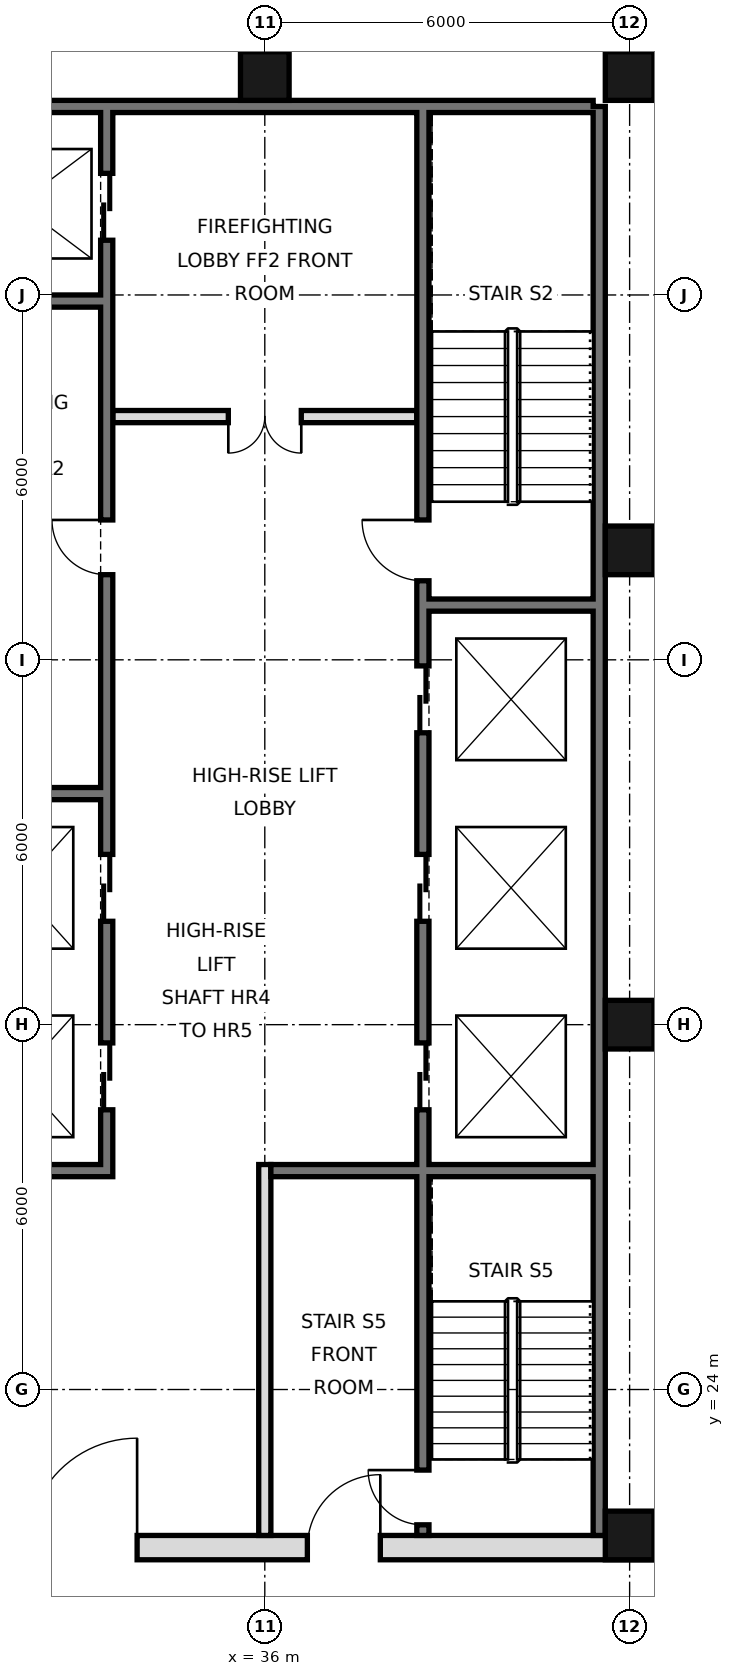
"""IFC4 building model, lengths in metres.
Left out: names, types, materials, properties, quantities, classifications, styles, units other than length and angle.
Written with IfcOpenShell. Run it as: python <this file> out.ifc"""

import sys

from ifc_helpers import new_model, si_unit, direction, frame, frame_2d, origin, origin_2d, place, context, subcontext, project, spatial, rectangle, hollow_rectangle, extrude, element, fill, save


model = new_model("IFC4")
c1 = context("Model", 3, precision=1e-05, world=origin(), true_north=direction((0.0, 1.0)))
c2 = subcontext(c1, "Body", "Model", "MODEL_VIEW")
j1 = project(units=[si_unit("LENGTHUNIT", "METRE"), si_unit("PLANEANGLEUNIT", "RADIAN")], contexts=[c1])
p1 = place(None, origin())
s1 = spatial("IfcSite", under=j1, at=p1, CompositionType="ELEMENT")
p2 = place(p1, origin())
s2 = spatial("IfcBuilding", under=s1, at=p2, CompositionType="ELEMENT")
p3 = place(p2, frame((0.0, 0.0, 263.0)))
s3 = spatial("IfcBuildingStorey", under=s2, at=p3, CompositionType="ELEMENT", Elevation=263.0)
for number, where, z_axis, x_axis in (
    (1, (36.0, 45.6, 0.0), (0.0, 0.0, 1.0), (1.0, 0.0, 0.0)),
    (2, (42.0, 21.6, 0.0), (0.0, 0.0, 1.0), (1.0, 0.0, 0.0)),
    (3, (42.0, 30.0, 0.0), (0.0, 0.0, 1.0), (1.0, 0.0, 0.0)),
    (4, (42.0, 37.8, 0.0), (0.0, 0.0, 1.0), (1.0, 0.0, 0.0)),
    (5, (42.0, 45.6, 0.0), (0.0, 0.0, 1.0), (1.0, 0.0, 0.0)),
):
    element("IfcColumn", number, at=place(p3, frame(where, z_axis=z_axis, x_axis=x_axis)), inside=s3, PredefinedType="COLUMN", context=c2, shape_type="SweptSolid", body=[
        extrude(hollow_rectangle(XDim=0.8, YDim=0.8, WallThickness=0.032, at=origin_2d()), origin(), (0.0, 0.0, 1.0), 3.6),
    ])
p4 = place(p3, frame((41.5, 21.6, 0.0), z_axis=(0.0, 0.0, 1.0), x_axis=(0.0, 1.0, 0.0)))
e6 = element("IfcWall", 6, at=p4, inside=s3, PredefinedType="SOLIDWALL", context=c2, shape_type="SweptSolid", body=[
    extrude(rectangle(XDim=23.5, YDim=0.2, at=frame_2d((11.75, 0.0))), origin(), (0.0, 0.0, 1.0), 3.42),
])
p5 = place(p3, frame((6.6, 45.1, 0.0), z_axis=(0.0, 0.0, 1.0), x_axis=(1.0, 0.0, 0.0)))
e7 = element("IfcWall", 7, at=p5, inside=s3, PredefinedType="SOLIDWALL", context=c2, shape_type="SweptSolid", body=[
    extrude(rectangle(XDim=34.8, YDim=0.2, at=frame_2d((17.4, 0.0))), origin(), (0.0, 0.0, 1.0), 3.42),
])
p6 = place(p3, frame((5.6, 21.4, 0.0), z_axis=(0.0, 0.0, 1.0), x_axis=(1.0, 0.0, 0.0)))
e8 = element("IfcWall", 8, at=p6, inside=s3, PredefinedType="SOLIDWALL", context=c2, shape_type="SweptSolid", body=[
    extrude(rectangle(XDim=36.8, YDim=0.4, at=frame_2d((18.4, 0.0))), origin(), (0.0, 0.0, 1.0), 3.42),
])
p7 = place(p6, frame((8.5, 0.0, 0.0)))
e9 = element("IfcOpeningElement", 9, at=p7, cuts=e8, PredefinedType="OPENING", context=c2, shape_type="SweptSolid", body=[
    extrude(rectangle(XDim=1.8, YDim=2.1, at=frame_2d((0.9, 1.05))), frame((0.0, 0.21, 0.0), z_axis=(0.0, -1.0, 0.0), x_axis=(1.0, 0.0, 0.0)), (0.0, 0.0, 1.0), 0.42),
])
p8 = place(p6, frame((17.5, 0.0, 0.0)))
e10 = element("IfcOpeningElement", 10, at=p8, cuts=e8, PredefinedType="OPENING", context=c2, shape_type="SweptSolid", body=[
    extrude(rectangle(XDim=1.8, YDim=2.1, at=frame_2d((0.9, 1.05))), frame((0.0, 0.21, 0.0), z_axis=(0.0, -1.0, 0.0), x_axis=(1.0, 0.0, 0.0)), (0.0, 0.0, 1.0), 0.42),
])
p9 = place(p6, frame((26.5, 0.0, 0.0)))
e11 = element("IfcOpeningElement", 11, at=p9, cuts=e8, PredefinedType="OPENING", context=c2, shape_type="SweptSolid", body=[
    extrude(rectangle(XDim=1.8, YDim=2.1, at=frame_2d((0.9, 1.05))), frame((0.0, 0.21, 0.0), z_axis=(0.0, -1.0, 0.0), x_axis=(1.0, 0.0, 0.0)), (0.0, 0.0, 1.0), 0.42),
])
p10 = place(p6, frame((4.5, 0.0, 0.0)))
e12 = element("IfcOpeningElement", 12, at=p10, cuts=e8, PredefinedType="OPENING", context=c2, shape_type="SweptSolid", body=[
    extrude(rectangle(XDim=1.2, YDim=2.1, at=frame_2d((0.6, 1.05))), frame((0.0, 0.21, 0.0), z_axis=(0.0, -1.0, 0.0), x_axis=(1.0, 0.0, 0.0)), (0.0, 0.0, 1.0), 0.42),
])
p11 = place(p6, frame((31.1, 0.0, 0.0)))
e13 = element("IfcOpeningElement", 13, at=p11, cuts=e8, PredefinedType="OPENING", context=c2, shape_type="SweptSolid", body=[
    extrude(rectangle(XDim=1.2, YDim=2.1, at=frame_2d((0.6, 1.05))), frame((0.0, 0.21, 0.0), z_axis=(0.0, -1.0, 0.0), x_axis=(1.0, 0.0, 0.0)), (0.0, 0.0, 1.0), 0.42),
])
p12 = place(p3, frame((33.4, 27.5, 0.0), z_axis=(0.0, 0.0, 1.0), x_axis=(0.0, 1.0, 0.0)))
e14 = element("IfcWall", 14, at=p12, inside=s3, PredefinedType="SOLIDWALL", context=c2, shape_type="SweptSolid", body=[
    extrude(rectangle(XDim=17.5, YDim=0.2, at=frame_2d((8.75, 0.0))), origin(), (0.0, 0.0, 1.0), 3.42),
])
p13 = place(p12, frame((1.1, 0.0, 0.0)))
e15 = element("IfcOpeningElement", 15, at=p13, cuts=e14, PredefinedType="OPENING", context=c2, shape_type="SweptSolid", body=[
    extrude(rectangle(XDim=1.1, YDim=2.1, at=frame_2d((0.55, 1.05))), frame((0.0, 0.11, 0.0), z_axis=(0.0, -1.0, 0.0), x_axis=(1.0, 0.0, 0.0)), (0.0, 0.0, 1.0), 0.22),
])
p14 = place(p12, frame((4.2, 0.0, 0.0)))
e16 = element("IfcOpeningElement", 16, at=p14, cuts=e14, PredefinedType="OPENING", context=c2, shape_type="SweptSolid", body=[
    extrude(rectangle(XDim=1.1, YDim=2.1, at=frame_2d((0.55, 1.05))), frame((0.0, 0.11, 0.0), z_axis=(0.0, -1.0, 0.0), x_axis=(1.0, 0.0, 0.0)), (0.0, 0.0, 1.0), 0.22),
])
p15 = place(p12, frame((15.4, 0.0, 0.0)))
e17 = element("IfcOpeningElement", 17, at=p15, cuts=e14, PredefinedType="OPENING", context=c2, shape_type="SweptSolid", body=[
    extrude(rectangle(XDim=1.1, YDim=2.1, at=frame_2d((0.55, 1.05))), frame((0.0, 0.11, 0.0), z_axis=(0.0, -1.0, 0.0), x_axis=(1.0, 0.0, 0.0)), (0.0, 0.0, 1.0), 0.22),
])
p16 = place(p12, frame((9.9, 0.0, 0.0)))
e18 = element("IfcOpeningElement", 18, at=p16, cuts=e14, PredefinedType="OPENING", context=c2, shape_type="SweptSolid", body=[
    extrude(rectangle(XDim=0.9, YDim=2.1, at=frame_2d((0.45, 1.05))), frame((0.0, 0.11, 0.0), z_axis=(0.0, -1.0, 0.0), x_axis=(1.0, 0.0, 0.0)), (0.0, 0.0, 1.0), 0.22),
])
p17 = place(p3, frame((36.0, 21.6, 0.0), z_axis=(0.0, 0.0, 1.0), x_axis=(0.0, 1.0, 0.0)))
e19 = element("IfcWall", 19, at=p17, inside=s3, PredefinedType="PARTITIONING", context=c2, shape_type="SweptSolid", body=[
    extrude(rectangle(XDim=6.1, YDim=0.2, at=frame_2d((3.05, 0.0))), origin(), (0.0, 0.0, 1.0), 3.42),
])
p18 = place(p3, frame((38.6, 21.6, 0.0), z_axis=(0.0, 0.0, 1.0), x_axis=(0.0, 1.0, 0.0)))
e20 = element("IfcWall", 20, at=p18, inside=s3, PredefinedType="SOLIDWALL", context=c2, shape_type="SweptSolid", body=[
    extrude(rectangle(XDim=23.4, YDim=0.2, at=frame_2d((11.7, 0.0))), origin(), (0.0, 0.0, 1.0), 3.42),
])
p19 = place(p18, frame((7.0, 0.0, 0.0)))
e21 = element("IfcOpeningElement", 21, at=p19, cuts=e20, PredefinedType="OPENING", context=c2, shape_type="SweptSolid", body=[
    extrude(rectangle(XDim=1.1, YDim=2.1, at=frame_2d((0.55, 1.05))), frame((0.0, 0.11, 0.0), z_axis=(0.0, -1.0, 0.0), x_axis=(1.0, 0.0, 0.0)), (0.0, 0.0, 1.0), 0.22),
])
p20 = place(p18, frame((10.1, 0.0, 0.0)))
e22 = element("IfcOpeningElement", 22, at=p20, cuts=e20, PredefinedType="OPENING", context=c2, shape_type="SweptSolid", body=[
    extrude(rectangle(XDim=1.1, YDim=2.1, at=frame_2d((0.55, 1.05))), frame((0.0, 0.11, 0.0), z_axis=(0.0, -1.0, 0.0), x_axis=(1.0, 0.0, 0.0)), (0.0, 0.0, 1.0), 0.22),
])
p21 = place(p18, frame((13.2, 0.0, 0.0)))
e23 = element("IfcOpeningElement", 23, at=p21, cuts=e20, PredefinedType="OPENING", context=c2, shape_type="SweptSolid", body=[
    extrude(rectangle(XDim=1.1, YDim=2.1, at=frame_2d((0.55, 1.05))), frame((0.0, 0.11, 0.0), z_axis=(0.0, -1.0, 0.0), x_axis=(1.0, 0.0, 0.0)), (0.0, 0.0, 1.0), 0.22),
])
p22 = place(p18, frame((15.7, 0.0, 0.0)))
e24 = element("IfcOpeningElement", 24, at=p22, cuts=e20, PredefinedType="OPENING", context=c2, shape_type="SweptSolid", body=[
    extrude(rectangle(XDim=1.0, YDim=2.1, at=frame_2d((0.5, 1.05))), frame((0.0, 0.11, 0.0), z_axis=(0.0, -1.0, 0.0), x_axis=(1.0, 0.0, 0.0)), (0.0, 0.0, 1.0), 0.22),
])
p23 = place(p18, frame((0.175, 0.0, 0.0)))
e25 = element("IfcOpeningElement", 25, at=p23, cuts=e20, PredefinedType="OPENING", context=c2, shape_type="SweptSolid", body=[
    extrude(rectangle(XDim=0.9, YDim=2.1, at=frame_2d((0.45, 1.05))), frame((0.0, 0.11, 0.0), z_axis=(0.0, -1.0, 0.0), x_axis=(1.0, 0.0, 0.0)), (0.0, 0.0, 1.0), 0.22),
])
p24 = place(p3, frame((30.6, 27.6, 0.0), z_axis=(0.0, 0.0, 1.0), x_axis=(1.0, 0.0, 0.0)))
e26 = element("IfcWall", 26, at=p24, inside=s3, PredefinedType="SOLIDWALL", context=c2, shape_type="SweptSolid", body=[
    extrude(rectangle(XDim=2.7, YDim=0.2, at=frame_2d((1.35, 0.0))), origin(), (0.0, 0.0, 1.0), 3.42),
])
p25 = place(p3, frame((36.1, 27.6, 0.0), z_axis=(0.0, 0.0, 1.0), x_axis=(1.0, 0.0, 0.0)))
e27 = element("IfcWall", 27, at=p25, inside=s3, PredefinedType="SOLIDWALL", context=c2, shape_type="SweptSolid", body=[
    extrude(rectangle(XDim=5.3, YDim=0.2, at=frame_2d((2.65, 0.0))), origin(), (0.0, 0.0, 1.0), 3.42),
])
for number, where, z_axis, x_axis in (
    (28, (30.6, 33.8, 0.0), (0.0, 0.0, 1.0), (1.0, 0.0, 0.0)),
    (29, (38.7, 36.9, 0.0), (0.0, 0.0, 1.0), (1.0, 0.0, 0.0)),
):
    element("IfcWall", number, at=place(p3, frame(where, z_axis=z_axis, x_axis=x_axis)), inside=s3, PredefinedType="SOLIDWALL", context=c2, shape_type="SweptSolid", body=[
        extrude(rectangle(XDim=2.7, YDim=0.2, at=frame_2d((1.35, 0.0))), origin(), (0.0, 0.0, 1.0), 3.42),
    ])
p26 = place(p3, frame((33.5, 40.0, 0.0), z_axis=(0.0, 0.0, 1.0), x_axis=(1.0, 0.0, 0.0)))
e30 = element("IfcWall", 30, at=p26, inside=s3, PredefinedType="PARTITIONING", context=c2, shape_type="SweptSolid", body=[
    extrude(rectangle(XDim=5.0, YDim=0.2, at=frame_2d((2.5, 0.0))), origin(), (0.0, 0.0, 1.0), 3.42),
])
p27 = place(p26, frame((1.9, 0.0, 0.0)))
e31 = element("IfcOpeningElement", 31, at=p27, cuts=e30, PredefinedType="OPENING", context=c2, shape_type="SweptSolid", body=[
    extrude(rectangle(XDim=1.2, YDim=2.1, at=frame_2d((0.6, 1.05))), frame((0.0, 0.11, 0.0), z_axis=(0.0, -1.0, 0.0), x_axis=(1.0, 0.0, 0.0)), (0.0, 0.0, 1.0), 0.22),
])
p28 = place(p3, frame((30.6, 41.9, 0.0), z_axis=(0.0, 0.0, 1.0), x_axis=(1.0, 0.0, 0.0)))
e32 = element("IfcWall", 32, at=p28, inside=s3, PredefinedType="SOLIDWALL", context=c2, shape_type="SweptSolid", body=[
    extrude(rectangle(XDim=2.7, YDim=0.2, at=frame_2d((1.35, 0.0))), origin(), (0.0, 0.0, 1.0), 3.42),
])
p29 = place(p9, frame((1.8, 0.0, 0.0), z_axis=(0.0, 0.0, 1.0), x_axis=(-1.0, 0.0, 0.0)))
e33 = element("IfcDoor", 33, at=p29, inside=s3, OperationType="SINGLE_SWING_LEFT", PredefinedType="DOOR", context=c2, shape_type="SweptSolid", body=[
    extrude(rectangle(XDim=1.8, YDim=2.1, at=frame_2d((0.9, 1.05))), frame((0.0, 0.025, 0.0), z_axis=(0.0, -1.0, 0.0), x_axis=(1.0, 0.0, 0.0)), (0.0, 0.0, 1.0), 0.05),
])
fill(e11, e33)
p30 = place(p11, frame((1.2, 0.0, 0.0), z_axis=(0.0, 0.0, 1.0), x_axis=(-1.0, 0.0, 0.0)))
e34 = element("IfcDoor", 34, at=p30, inside=s3, OperationType="SINGLE_SWING_LEFT", PredefinedType="DOOR", context=c2, shape_type="SweptSolid", body=[
    extrude(rectangle(XDim=1.2, YDim=2.1, at=frame_2d((0.6, 1.05))), frame((0.0, 0.025, 0.0), z_axis=(0.0, -1.0, 0.0), x_axis=(1.0, 0.0, 0.0)), (0.0, 0.0, 1.0), 0.05),
])
fill(e13, e34)
p31 = place(p27, frame((1.2, 0.0, 0.0), z_axis=(0.0, 0.0, 1.0), x_axis=(-1.0, 0.0, 0.0)))
e35 = element("IfcDoor", 35, at=p31, inside=s3, OperationType="DOUBLE_DOOR_SINGLE_SWING", PredefinedType="DOOR", context=c2, shape_type="SweptSolid", body=[
    extrude(rectangle(XDim=1.2, YDim=2.1, at=frame_2d((0.6, 1.05))), frame((0.0, 0.025, 0.0), z_axis=(0.0, -1.0, 0.0), x_axis=(1.0, 0.0, 0.0)), (0.0, 0.0, 1.0), 0.05),
])
fill(e31, e35)
p32 = place(p19, origin())
e36 = element("IfcDoor", 36, at=p32, inside=s3, OperationType="DOUBLE_DOOR_SLIDING", PredefinedType="DOOR", context=c2, shape_type="SweptSolid", body=[
    extrude(rectangle(XDim=1.1, YDim=2.1, at=frame_2d((0.55, 1.05))), frame((0.0, 0.025, 0.0), z_axis=(0.0, -1.0, 0.0), x_axis=(1.0, 0.0, 0.0)), (0.0, 0.0, 1.0), 0.05),
])
fill(e21, e36)
p33 = place(p20, origin())
e37 = element("IfcDoor", 37, at=p33, inside=s3, OperationType="DOUBLE_DOOR_SLIDING", PredefinedType="DOOR", context=c2, shape_type="SweptSolid", body=[
    extrude(rectangle(XDim=1.1, YDim=2.1, at=frame_2d((0.55, 1.05))), frame((0.0, 0.025, 0.0), z_axis=(0.0, -1.0, 0.0), x_axis=(1.0, 0.0, 0.0)), (0.0, 0.0, 1.0), 0.05),
])
fill(e22, e37)
p34 = place(p21, origin())
e38 = element("IfcDoor", 38, at=p34, inside=s3, OperationType="DOUBLE_DOOR_SLIDING", PredefinedType="DOOR", context=c2, shape_type="SweptSolid", body=[
    extrude(rectangle(XDim=1.1, YDim=2.1, at=frame_2d((0.55, 1.05))), frame((0.0, 0.025, 0.0), z_axis=(0.0, -1.0, 0.0), x_axis=(1.0, 0.0, 0.0)), (0.0, 0.0, 1.0), 0.05),
])
fill(e23, e38)
p35 = place(p13, origin())
e39 = element("IfcDoor", 39, at=p35, inside=s3, OperationType="DOUBLE_DOOR_SLIDING", PredefinedType="DOOR", context=c2, shape_type="SweptSolid", body=[
    extrude(rectangle(XDim=1.1, YDim=2.1, at=frame_2d((0.55, 1.05))), frame((0.0, 0.025, 0.0), z_axis=(0.0, -1.0, 0.0), x_axis=(1.0, 0.0, 0.0)), (0.0, 0.0, 1.0), 0.05),
])
fill(e15, e39)
p36 = place(p14, origin())
e40 = element("IfcDoor", 40, at=p36, inside=s3, OperationType="DOUBLE_DOOR_SLIDING", PredefinedType="DOOR", context=c2, shape_type="SweptSolid", body=[
    extrude(rectangle(XDim=1.1, YDim=2.1, at=frame_2d((0.55, 1.05))), frame((0.0, 0.025, 0.0), z_axis=(0.0, -1.0, 0.0), x_axis=(1.0, 0.0, 0.0)), (0.0, 0.0, 1.0), 0.05),
])
fill(e16, e40)
p37 = place(p15, origin())
e41 = element("IfcDoor", 41, at=p37, inside=s3, OperationType="DOUBLE_DOOR_SLIDING", PredefinedType="DOOR", context=c2, shape_type="SweptSolid", body=[
    extrude(rectangle(XDim=1.1, YDim=2.1, at=frame_2d((0.55, 1.05))), frame((0.0, 0.025, 0.0), z_axis=(0.0, -1.0, 0.0), x_axis=(1.0, 0.0, 0.0)), (0.0, 0.0, 1.0), 0.05),
])
fill(e17, e41)
p38 = place(p22, frame((1.0, 0.0, 0.0), z_axis=(0.0, 0.0, 1.0), x_axis=(-1.0, 0.0, 0.0)))
e42 = element("IfcDoor", 42, at=p38, inside=s3, OperationType="SINGLE_SWING_LEFT", PredefinedType="DOOR", context=c2, shape_type="SweptSolid", body=[
    extrude(rectangle(XDim=1.0, YDim=2.1, at=frame_2d((0.5, 1.05))), frame((0.0, 0.025, 0.0), z_axis=(0.0, -1.0, 0.0), x_axis=(1.0, 0.0, 0.0)), (0.0, 0.0, 1.0), 0.05),
])
fill(e24, e42)
p39 = place(p23, frame((0.9, 0.0, 0.0), z_axis=(0.0, 0.0, 1.0), x_axis=(-1.0, 0.0, 0.0)))
e43 = element("IfcDoor", 43, at=p39, inside=s3, OperationType="SINGLE_SWING_LEFT", PredefinedType="DOOR", context=c2, shape_type="SweptSolid", body=[
    extrude(rectangle(XDim=0.9, YDim=2.1, at=frame_2d((0.45, 1.05))), frame((0.0, 0.025, 0.0), z_axis=(0.0, -1.0, 0.0), x_axis=(1.0, 0.0, 0.0)), (0.0, 0.0, 1.0), 0.05),
])
fill(e25, e43)
p40 = place(p16, frame((0.9, 0.0, 0.0), z_axis=(0.0, 0.0, 1.0), x_axis=(-1.0, 0.0, 0.0)))
e44 = element("IfcDoor", 44, at=p40, inside=s3, OperationType="SINGLE_SWING_LEFT", PredefinedType="DOOR", context=c2, shape_type="SweptSolid", body=[
    extrude(rectangle(XDim=0.9, YDim=2.1, at=frame_2d((0.45, 1.05))), frame((0.0, 0.025, 0.0), z_axis=(0.0, -1.0, 0.0), x_axis=(1.0, 0.0, 0.0)), (0.0, 0.0, 1.0), 0.05),
])
fill(e18, e44)
save(model, sys.argv[1])
